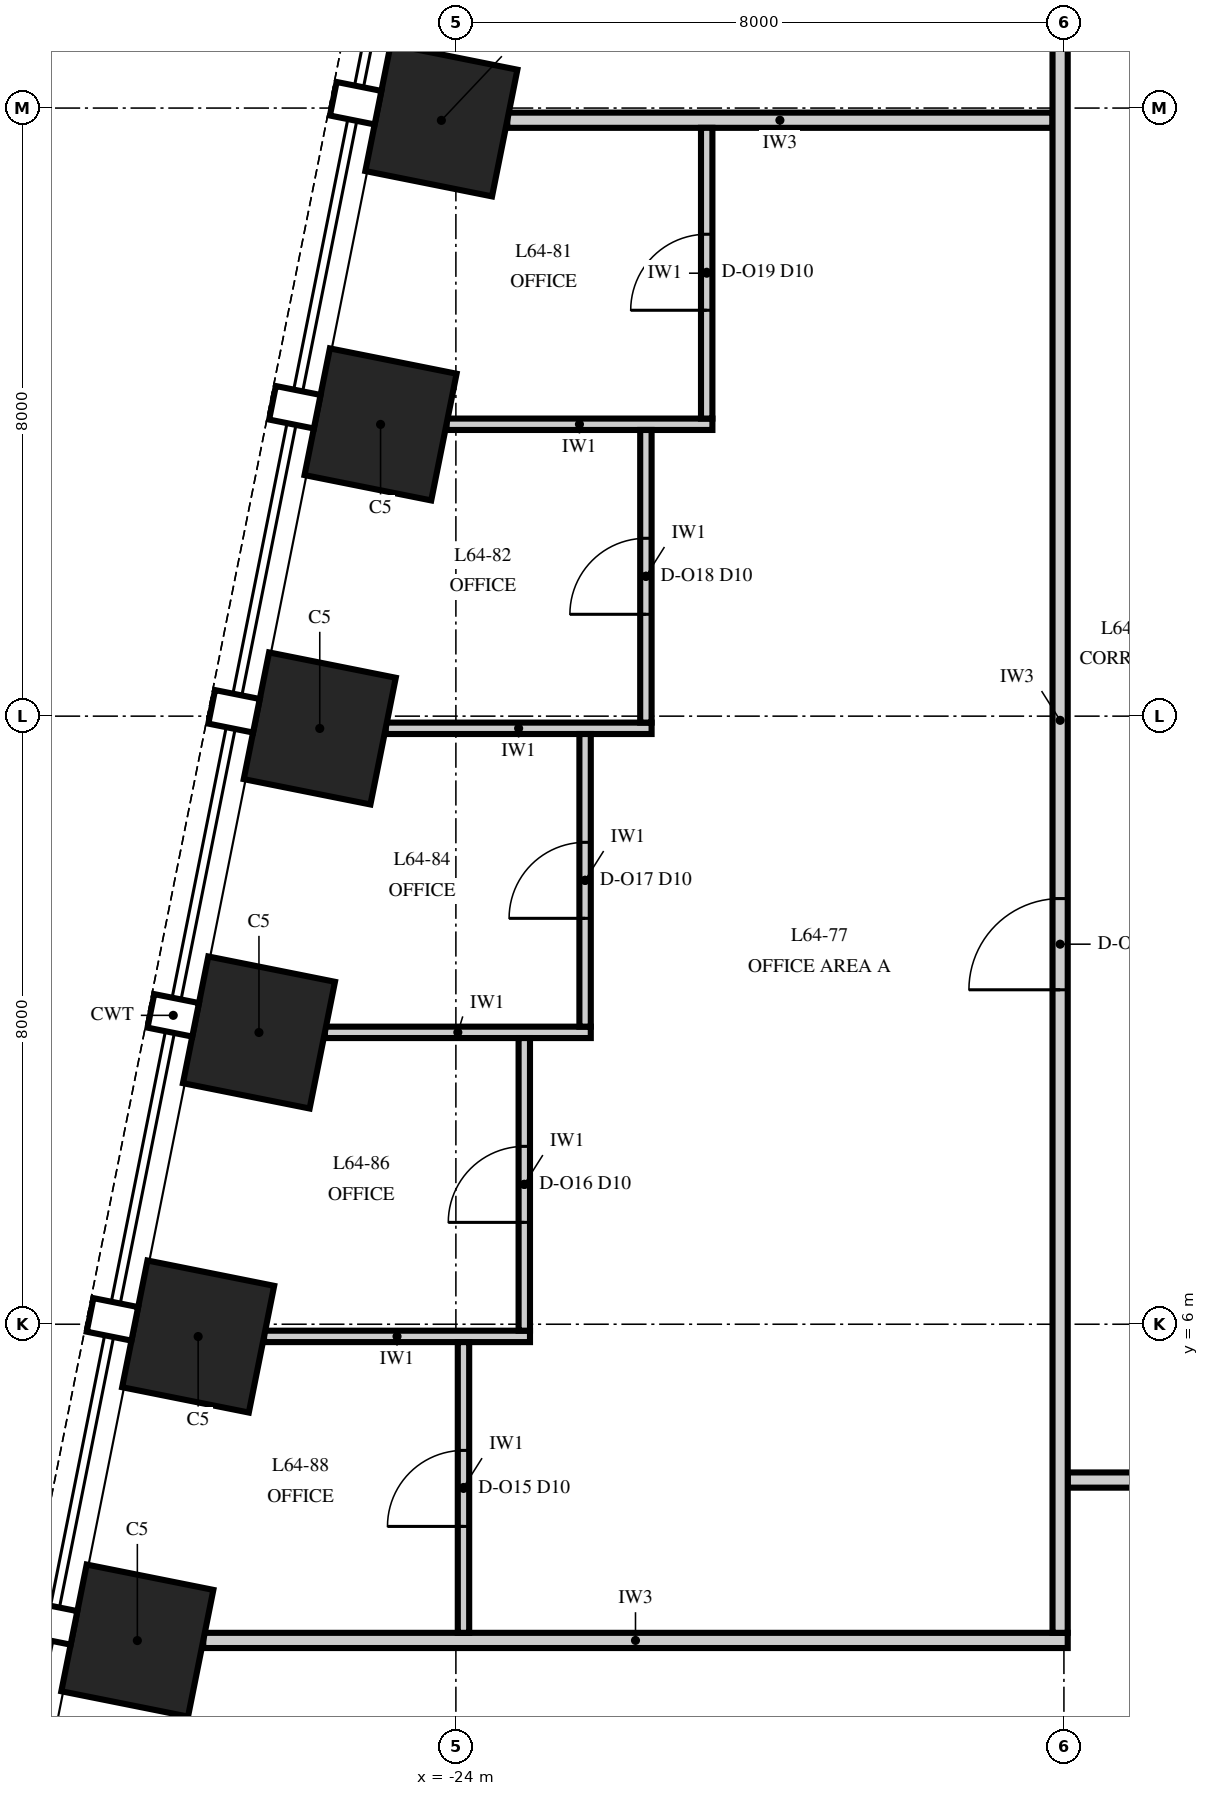
"""IFC4 building model, lengths in metres.
Left out: names, types, materials, properties, quantities, classifications, styles, units other than length and angle.
Written with IfcOpenShell. Run it as: python <this file> out.ifc"""

import sys

from ifc_helpers import new_model, si_unit, direction, frame, frame_2d, origin, origin_2d, place, context, subcontext, project, spatial, rectangle, extrude, element, fill, save


model = new_model("IFC4")
c1 = context("Model", 3, precision=1e-05, world=origin(), true_north=direction((0.0, 1.0)))
c2 = subcontext(c1, "Body", "Model", "MODEL_VIEW")
j1 = project(units=[si_unit("LENGTHUNIT", "METRE"), si_unit("PLANEANGLEUNIT", "RADIAN")], contexts=[c1])
p1 = place(None, origin())
s1 = spatial("IfcSite", under=j1, at=p1, CompositionType="ELEMENT")
p2 = place(p1, origin())
s2 = spatial("IfcBuilding", under=s1, at=p2, CompositionType="ELEMENT")
p3 = place(p2, frame((0.0, 0.0, 276.0)))
s3 = spatial("IfcBuildingStorey", under=s2, at=p3, CompositionType="ELEMENT", Elevation=276.0)
for number, where, z_axis, x_axis in (
    (1, (-24.191, 21.838, 0.0), (0.0, 0.0, 1.0), (-0.196, -0.981, 0.0)),
    (2, (-24.991, 17.838, 0.0), (0.0, 0.0, 1.0), (-0.196, -0.981, 0.0)),
    (3, (-25.791, 13.838, 0.0), (0.0, 0.0, 1.0), (-0.196, -0.981, 0.0)),
    (4, (-26.591, 9.838, 0.0), (0.0, 0.0, 1.0), (-0.196, -0.981, 0.0)),
    (5, (-27.391, 5.838, 0.0), (0.0, 0.0, 1.0), (-0.196, -0.981, 0.0)),
    (6, (-28.191, 1.838, 0.0), (0.0, 0.0, 1.0), (-0.196, -0.981, 0.0)),
):
    element("IfcColumn", number, at=place(p3, frame(where, z_axis=z_axis, x_axis=x_axis)), inside=s3, PredefinedType="COLUMN", context=c2, shape_type="SweptSolid", body=[
        extrude(rectangle(XDim=1.7, YDim=1.7, at=origin_2d()), origin(), (0.0, 0.0, 1.0), 4.0),
    ])
p4 = place(p3, frame((-27.324, 1.84, 0.0), z_axis=(0.0, 0.0, 1.0), x_axis=(1.0, 0.0, 0.0)))
e7 = element("IfcWall", 7, at=p4, inside=s3, PredefinedType="PARTITIONING", context=c2, shape_type="SweptSolid", body=[
    extrude(rectangle(XDim=11.374, YDim=0.2, at=frame_2d((5.687, 0.0))), origin(), (0.0, 0.0, 1.0), 3.23),
])
p5 = place(p3, frame((-15.95, 3.95, 0.0), z_axis=(0.0, 0.0, 1.0), x_axis=(1.0, 0.0, 0.0)))
e8 = element("IfcWall", 8, at=p5, inside=s3, PredefinedType="PARTITIONING", context=c2, shape_type="SweptSolid", body=[
    extrude(rectangle(XDim=31.9, YDim=0.2, at=frame_2d((15.95, 0.0))), origin(), (0.0, 0.0, 1.0), 3.23),
])
p6 = place(p5, frame((7.35, 0.0, 0.0)))
e9 = element("IfcOpeningElement", 9, at=p6, cuts=e8, PredefinedType="OPENING", context=c2, shape_type="SweptSolid", body=[
    extrude(rectangle(XDim=1.2, YDim=2.4, at=frame_2d((0.6, 1.2))), frame((0.0, 0.115, 0.0), z_axis=(0.0, -1.0, 0.0), x_axis=(1.0, 0.0, 0.0)), (0.0, 0.0, 1.0), 0.23),
])
p7 = place(p5, frame((23.35, 0.0, 0.0)))
e10 = element("IfcOpeningElement", 10, at=p7, cuts=e8, PredefinedType="OPENING", context=c2, shape_type="SweptSolid", body=[
    extrude(rectangle(XDim=1.2, YDim=2.4, at=frame_2d((0.6, 1.2))), frame((0.0, 0.115, 0.0), z_axis=(0.0, -1.0, 0.0), x_axis=(1.0, 0.0, 0.0)), (0.0, 0.0, 1.0), 0.23),
])
p8 = place(p3, frame((-26.524, 5.84, 0.0), z_axis=(0.0, 0.0, 1.0), x_axis=(1.0, 0.0, 0.0)))
e11 = element("IfcWall", 11, at=p8, inside=s3, PredefinedType="PARTITIONING", context=c2, shape_type="SweptSolid", body=[
    extrude(rectangle(XDim=3.499, YDim=0.15, at=frame_2d((1.75, 0.0))), origin(), (0.0, 0.0, 1.0), 2.842),
])
for number, where, z_axis, x_axis in (
    (12, (-25.724, 9.84, 0.0), (0.0, 0.0, 1.0), (1.0, 0.0, 0.0)),
    (13, (-24.924, 13.84, 0.0), (0.0, 0.0, 1.0), (1.0, 0.0, 0.0)),
    (14, (-24.124, 17.84, 0.0), (0.0, 0.0, 1.0), (1.0, 0.0, 0.0)),
):
    element("IfcWall", number, at=place(p3, frame(where, z_axis=z_axis, x_axis=x_axis)), inside=s3, PredefinedType="PARTITIONING", context=c2, shape_type="SweptSolid", body=[
        extrude(rectangle(XDim=3.499, YDim=0.15, at=frame_2d((1.75, 0.0))), origin(), (0.0, 0.0, 1.0), 3.23),
    ])
p9 = place(p3, frame((-23.324, 21.84, 0.0), z_axis=(0.0, 0.0, 1.0), x_axis=(1.0, 0.0, 0.0)))
e15 = element("IfcWall", 15, at=p9, inside=s3, PredefinedType="PARTITIONING", context=c2, shape_type="SweptSolid", body=[
    extrude(rectangle(XDim=7.174, YDim=0.2, at=frame_2d((3.587, 0.0))), origin(), (0.0, 0.0, 1.0), 3.23),
])
p10 = place(p3, frame((-23.9, 1.94, 0.0), z_axis=(0.0, 0.0, 1.0), x_axis=(0.0, 1.0, 0.0)))
e16 = element("IfcWall", 16, at=p10, inside=s3, PredefinedType="PARTITIONING", context=c2, shape_type="SweptSolid", body=[
    extrude(rectangle(XDim=3.825, YDim=0.15, at=frame_2d((1.913, 0.0))), origin(), (0.0, 0.0, 1.0), 3.85),
])
p11 = place(p10, frame((1.4, 0.0, 0.0)))
e17 = element("IfcOpeningElement", 17, at=p11, cuts=e16, PredefinedType="OPENING", context=c2, shape_type="SweptSolid", body=[
    extrude(rectangle(XDim=1.0, YDim=2.3, at=frame_2d((0.5, 1.15))), frame((0.0, 0.09, 0.0), z_axis=(0.0, -1.0, 0.0), x_axis=(1.0, 0.0, 0.0)), (0.0, 0.0, 1.0), 0.18),
])
p12 = place(p3, frame((-23.1, 5.915, 0.0), z_axis=(0.0, 0.0, 1.0), x_axis=(0.0, 1.0, 0.0)))
e18 = element("IfcWall", 18, at=p12, inside=s3, PredefinedType="PARTITIONING", context=c2, shape_type="SweptSolid", body=[
    extrude(rectangle(XDim=3.85, YDim=0.15, at=frame_2d((1.925, 0.0))), origin(), (0.0, 0.0, 1.0), 2.842),
])
p13 = place(p12, frame((1.425, 0.0, 0.0)))
e19 = element("IfcOpeningElement", 19, at=p13, cuts=e18, PredefinedType="OPENING", context=c2, shape_type="SweptSolid", body=[
    extrude(rectangle(XDim=1.0, YDim=2.3, at=frame_2d((0.5, 1.15))), frame((0.0, 0.09, 0.0), z_axis=(0.0, -1.0, 0.0), x_axis=(1.0, 0.0, 0.0)), (0.0, 0.0, 1.0), 0.18),
])
p14 = place(p3, frame((-22.3, 9.915, 0.0), z_axis=(0.0, 0.0, 1.0), x_axis=(0.0, 1.0, 0.0)))
e20 = element("IfcWall", 20, at=p14, inside=s3, PredefinedType="PARTITIONING", context=c2, shape_type="SweptSolid", body=[
    extrude(rectangle(XDim=3.85, YDim=0.15, at=frame_2d((1.925, 0.0))), origin(), (0.0, 0.0, 1.0), 3.85),
])
p15 = place(p14, frame((1.425, 0.0, 0.0)))
e21 = element("IfcOpeningElement", 21, at=p15, cuts=e20, PredefinedType="OPENING", context=c2, shape_type="SweptSolid", body=[
    extrude(rectangle(XDim=1.0, YDim=2.3, at=frame_2d((0.5, 1.15))), frame((0.0, 0.09, 0.0), z_axis=(0.0, -1.0, 0.0), x_axis=(1.0, 0.0, 0.0)), (0.0, 0.0, 1.0), 0.18),
])
p16 = place(p3, frame((-21.5, 13.915, 0.0), z_axis=(0.0, 0.0, 1.0), x_axis=(0.0, 1.0, 0.0)))
e22 = element("IfcWall", 22, at=p16, inside=s3, PredefinedType="PARTITIONING", context=c2, shape_type="SweptSolid", body=[
    extrude(rectangle(XDim=3.85, YDim=0.15, at=frame_2d((1.925, 0.0))), origin(), (0.0, 0.0, 1.0), 3.23),
])
p17 = place(p16, frame((1.425, 0.0, 0.0)))
e23 = element("IfcOpeningElement", 23, at=p17, cuts=e22, PredefinedType="OPENING", context=c2, shape_type="SweptSolid", body=[
    extrude(rectangle(XDim=1.0, YDim=2.3, at=frame_2d((0.5, 1.15))), frame((0.0, 0.09, 0.0), z_axis=(0.0, -1.0, 0.0), x_axis=(1.0, 0.0, 0.0)), (0.0, 0.0, 1.0), 0.18),
])
p18 = place(p3, frame((-20.7, 17.915, 0.0), z_axis=(0.0, 0.0, 1.0), x_axis=(0.0, 1.0, 0.0)))
e24 = element("IfcWall", 24, at=p18, inside=s3, PredefinedType="PARTITIONING", context=c2, shape_type="SweptSolid", body=[
    extrude(rectangle(XDim=3.825, YDim=0.15, at=frame_2d((1.913, 0.0))), origin(), (0.0, 0.0, 1.0), 3.23),
])
p19 = place(p18, frame((1.425, 0.0, 0.0)))
e25 = element("IfcOpeningElement", 25, at=p19, cuts=e24, PredefinedType="OPENING", context=c2, shape_type="SweptSolid", body=[
    extrude(rectangle(XDim=1.0, YDim=2.3, at=frame_2d((0.5, 1.15))), frame((0.0, 0.09, 0.0), z_axis=(0.0, -1.0, 0.0), x_axis=(1.0, 0.0, 0.0)), (0.0, 0.0, 1.0), 0.18),
])
p20 = place(p3, frame((-16.05, 1.94, 0.0), z_axis=(0.0, 0.0, 1.0), x_axis=(0.0, 1.0, 0.0)))
e26 = element("IfcWall", 26, at=p20, inside=s3, PredefinedType="PARTITIONING", context=c2, shape_type="SweptSolid", body=[
    extrude(rectangle(XDim=24.01, YDim=0.2, at=frame_2d((12.005, 0.0))), origin(), (0.0, 0.0, 1.0), 2.842),
])
p21 = place(p20, frame((8.46, 0.0, 0.0)))
e27 = element("IfcOpeningElement", 27, at=p21, cuts=e26, PredefinedType="OPENING", context=c2, shape_type="SweptSolid", body=[
    extrude(rectangle(XDim=1.2, YDim=2.4, at=frame_2d((0.6, 1.2))), frame((0.0, 0.115, 0.0), z_axis=(0.0, -1.0, 0.0), x_axis=(1.0, 0.0, 0.0)), (0.0, 0.0, 1.0), 0.23),
])
p22 = place(p20, frame((22.46, 0.0, 0.0)))
e28 = element("IfcOpeningElement", 28, at=p22, cuts=e26, PredefinedType="OPENING", context=c2, shape_type="SweptSolid", body=[
    extrude(rectangle(XDim=1.2, YDim=2.4, at=frame_2d((0.6, 1.2))), frame((0.0, 0.115, 0.0), z_axis=(0.0, -1.0, 0.0), x_axis=(1.0, 0.0, 0.0)), (0.0, 0.0, 1.0), 0.23),
])
p23 = place(p11, origin())
e29 = element("IfcDoor", 29, at=p23, inside=s3, OperationType="SINGLE_SWING_LEFT", PredefinedType="DOOR", context=c2, shape_type="SweptSolid", body=[
    extrude(rectangle(XDim=1.0, YDim=2.3, at=frame_2d((0.5, 1.15))), frame((0.0, 0.075, 0.0), z_axis=(0.0, -1.0, 0.0), x_axis=(1.0, 0.0, 0.0)), (0.0, 0.0, 1.0), 0.149),
])
fill(e17, e29)
p24 = place(p13, origin())
e30 = element("IfcDoor", 30, at=p24, inside=s3, OperationType="SINGLE_SWING_LEFT", PredefinedType="DOOR", context=c2, shape_type="SweptSolid", body=[
    extrude(rectangle(XDim=1.0, YDim=2.3, at=frame_2d((0.5, 1.15))), frame((0.0, 0.075, 0.0), z_axis=(0.0, -1.0, 0.0), x_axis=(1.0, 0.0, 0.0)), (0.0, 0.0, 1.0), 0.149),
])
fill(e19, e30)
p25 = place(p15, origin())
e31 = element("IfcDoor", 31, at=p25, inside=s3, OperationType="SINGLE_SWING_LEFT", PredefinedType="DOOR", context=c2, shape_type="SweptSolid", body=[
    extrude(rectangle(XDim=1.0, YDim=2.3, at=frame_2d((0.5, 1.15))), frame((0.0, 0.075, 0.0), z_axis=(0.0, -1.0, 0.0), x_axis=(1.0, 0.0, 0.0)), (0.0, 0.0, 1.0), 0.149),
])
fill(e21, e31)
p26 = place(p17, origin())
e32 = element("IfcDoor", 32, at=p26, inside=s3, OperationType="SINGLE_SWING_LEFT", PredefinedType="DOOR", context=c2, shape_type="SweptSolid", body=[
    extrude(rectangle(XDim=1.0, YDim=2.3, at=frame_2d((0.5, 1.15))), frame((0.0, 0.075, 0.0), z_axis=(0.0, -1.0, 0.0), x_axis=(1.0, 0.0, 0.0)), (0.0, 0.0, 1.0), 0.149),
])
fill(e23, e32)
p27 = place(p19, origin())
e33 = element("IfcDoor", 33, at=p27, inside=s3, OperationType="SINGLE_SWING_LEFT", PredefinedType="DOOR", context=c2, shape_type="SweptSolid", body=[
    extrude(rectangle(XDim=1.0, YDim=2.3, at=frame_2d((0.5, 1.15))), frame((0.0, 0.075, 0.0), z_axis=(0.0, -1.0, 0.0), x_axis=(1.0, 0.0, 0.0)), (0.0, 0.0, 1.0), 0.149),
])
fill(e25, e33)
p28 = place(p21, origin())
e34 = element("IfcDoor", 34, at=p28, inside=s3, OperationType="SINGLE_SWING_LEFT", PredefinedType="DOOR", context=c2, shape_type="SweptSolid", body=[
    extrude(rectangle(XDim=1.2, YDim=2.4, at=frame_2d((0.6, 1.2))), frame((0.0, 0.1, 0.0), z_axis=(0.0, -1.0, 0.0), x_axis=(1.0, 0.0, 0.0)), (0.0, 0.0, 1.0), 0.199),
])
fill(e27, e34)
save(model, sys.argv[1])
